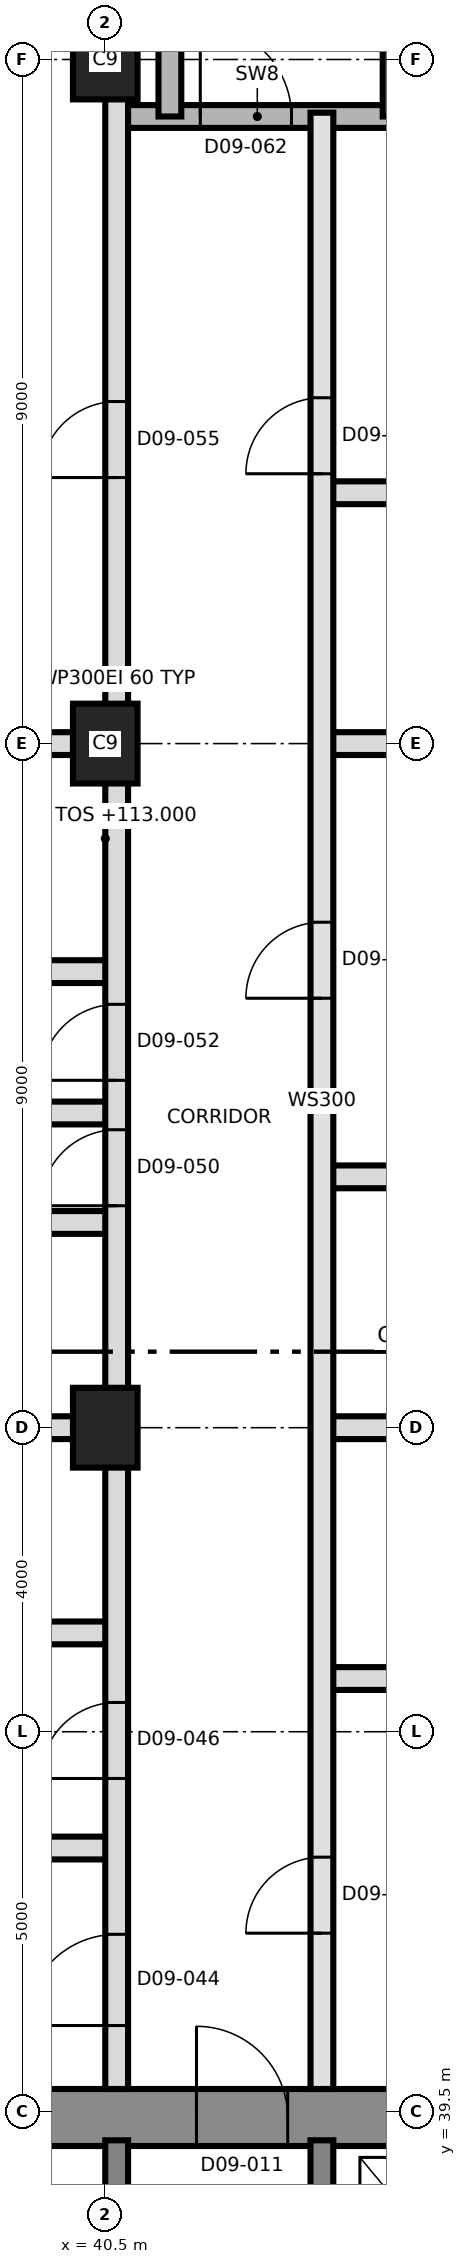
"""IFC4 building model, lengths in metres.
Left out: names, types, materials, properties, quantities, classifications, styles, units other than length and angle.
Written with IfcOpenShell. Run it as: python <this file> out.ifc"""

import sys

from ifc_helpers import new_model, si_unit, direction, frame, frame_2d, origin, origin_2d, place, context, subcontext, project, spatial, rectangle, extrude, element, fill, save


model = new_model("IFC4")
c1 = context("Model", 3, precision=1e-05, world=origin(), true_north=direction((0.0, 1.0)))
c2 = subcontext(c1, "Body", "Model", "MODEL_VIEW")
j1 = project(units=[si_unit("LENGTHUNIT", "METRE"), si_unit("PLANEANGLEUNIT", "RADIAN")], contexts=[c1])
p1 = place(None, origin())
s1 = spatial("IfcSite", under=j1, at=p1, CompositionType="ELEMENT")
p2 = place(p1, origin())
s2 = spatial("IfcBuilding", under=s1, at=p2, CompositionType="ELEMENT")
p3 = place(p2, frame((0.0, 0.0, 113.0)))
s3 = spatial("IfcBuildingStorey", under=s2, at=p3, CompositionType="ELEMENT", Elevation=113.0)
p4 = place(p3, frame((31.125, 39.425, 0.0), z_axis=(0.0, 0.0, 1.0), x_axis=(1.0, 0.0, 0.0)))
e1 = element("IfcWall", 1, at=p4, inside=s3, PredefinedType="SHEAR", context=c2, shape_type="SweptSolid", body=[
    extrude(rectangle(XDim=27.0, YDim=0.75, at=frame_2d((13.5, 0.0))), origin(), (0.0, 0.0, 1.0), 3.7),
])
p5 = place(p4, frame((10.575, 0.0, 0.0)))
e2 = element("IfcOpeningElement", 2, at=p5, cuts=e1, PredefinedType="OPENING", context=c2, shape_type="SweptSolid", body=[
    extrude(rectangle(XDim=1.2, YDim=2.1, at=frame_2d((0.6, 1.05))), frame((0.0, 0.385, 0.0), z_axis=(0.0, -1.0, 0.0), x_axis=(1.0, 0.0, 0.0)), (0.0, 0.0, 1.0), 0.77),
])
for number, where, z_axis, x_axis in (
    (3, (40.65, 33.5, 0.0), (0.0, 0.0, 1.0), (0.0, 1.0, 0.0)),
    (4, (43.35, 33.5, 0.0), (0.0, 0.0, 1.0), (0.0, 1.0, 0.0)),
):
    element("IfcWall", number, at=place(p3, frame(where, z_axis=z_axis, x_axis=x_axis)), inside=s3, PredefinedType="SHEAR", context=c2, shape_type="SweptSolid", body=[
        extrude(rectangle(XDim=5.625, YDim=0.3, at=frame_2d((2.812, 0.0))), origin(), (0.0, 0.0, 1.0), 3.7),
    ])
for number, where, z_axis, x_axis in (
    (5, (40.5, 48.5, 0.0), (0.0, 0.0, 1.0), (0.0, 1.0, 0.0)),
    (6, (40.5, 57.5, 0.0), (0.0, 0.0, 1.0), (0.0, 1.0, 0.0)),
    (7, (40.5, 66.5, 0.0), (0.0, 0.0, 1.0), (0.0, 1.0, 0.0)),
):
    element("IfcColumn", number, at=place(p3, frame(where, z_axis=z_axis, x_axis=x_axis)), inside=s3, PredefinedType="COLUMN", context=c2, shape_type="SweptSolid", body=[
        extrude(rectangle(XDim=1.05, YDim=0.85, at=origin_2d()), origin(), (0.0, 0.0, 1.0), 3.7),
    ])
p6 = place(p3, frame((30.35, 42.97, 0.0), z_axis=(0.0, 0.0, 1.0), x_axis=(1.0, 0.0, 0.0)))
e8 = element("IfcWall", 8, at=p6, inside=s3, PredefinedType="PARTITIONING", context=c2, shape_type="SweptSolid", body=[
    extrude(rectangle(XDim=10.3, YDim=0.3, at=frame_2d((5.15, 0.0))), origin(), (0.0, 0.0, 1.0), 3.4),
])
p7 = place(p3, frame((43.35, 45.2, 0.0), z_axis=(0.0, 0.0, 1.0), x_axis=(1.0, 0.0, 0.0)))
e9 = element("IfcWall", 9, at=p7, inside=s3, PredefinedType="PARTITIONING", context=c2, shape_type="SweptSolid", body=[
    extrude(rectangle(XDim=3.5, YDim=0.3, at=frame_2d((1.75, 0.0))), origin(), (0.0, 0.0, 1.0), 3.4),
])
p8 = place(p3, frame((37.45, 45.8, 0.0), z_axis=(0.0, 0.0, 1.0), x_axis=(1.0, 0.0, 0.0)))
e10 = element("IfcWall", 10, at=p8, inside=s3, PredefinedType="PARTITIONING", context=c2, shape_type="SweptSolid", body=[
    extrude(rectangle(XDim=3.2, YDim=0.3, at=frame_2d((1.6, 0.0))), origin(), (0.0, 0.0, 1.0), 3.4),
])
p9 = place(p3, frame((30.35, 48.5, 0.0), z_axis=(0.0, 0.0, 1.0), x_axis=(1.0, 0.0, 0.0)))
e11 = element("IfcWall", 11, at=p9, inside=s3, PredefinedType="PARTITIONING", context=c2, shape_type="SweptSolid", body=[
    extrude(rectangle(XDim=10.3, YDim=0.3, at=frame_2d((5.15, 0.0))), origin(), (0.0, 0.0, 1.0), 3.4),
])
p10 = place(p3, frame((43.35, 48.5, 0.0), z_axis=(0.0, 0.0, 1.0), x_axis=(1.0, 0.0, 0.0)))
e12 = element("IfcWall", 12, at=p10, inside=s3, PredefinedType="PARTITIONING", context=c2, shape_type="SweptSolid", body=[
    extrude(rectangle(XDim=7.48, YDim=0.3, at=frame_2d((3.74, 0.0))), origin(), (0.0, 0.0, 1.0), 3.4),
])
p11 = place(p3, frame((37.35, 51.2, 0.0), z_axis=(0.0, 0.0, 1.0), x_axis=(1.0, 0.0, 0.0)))
e13 = element("IfcWall", 13, at=p11, inside=s3, PredefinedType="PARTITIONING", context=c2, shape_type="SweptSolid", body=[
    extrude(rectangle(XDim=3.3, YDim=0.3, at=frame_2d((1.65, 0.0))), origin(), (0.0, 0.0, 1.0), 3.4),
])
p12 = place(p3, frame((43.35, 51.8, 0.0), z_axis=(0.0, 0.0, 1.0), x_axis=(1.0, 0.0, 0.0)))
e14 = element("IfcWall", 14, at=p12, inside=s3, PredefinedType="PARTITIONING", context=c2, shape_type="SweptSolid", body=[
    extrude(rectangle(XDim=3.5, YDim=0.3, at=frame_2d((1.75, 0.0))), origin(), (0.0, 0.0, 1.0), 3.4),
])
p13 = place(p3, frame((30.35, 52.64, 0.0), z_axis=(0.0, 0.0, 1.0), x_axis=(1.0, 0.0, 0.0)))
e15 = element("IfcWall", 15, at=p13, inside=s3, PredefinedType="PARTITIONING", context=c2, shape_type="SweptSolid", body=[
    extrude(rectangle(XDim=10.3, YDim=0.3, at=frame_2d((5.15, 0.0))), origin(), (0.0, 0.0, 1.0), 3.4),
])
p14 = place(p3, frame((37.35, 54.5, 0.0), z_axis=(0.0, 0.0, 1.0), x_axis=(1.0, 0.0, 0.0)))
e16 = element("IfcWall", 16, at=p14, inside=s3, PredefinedType="PARTITIONING", context=c2, shape_type="SweptSolid", body=[
    extrude(rectangle(XDim=3.3, YDim=0.3, at=frame_2d((1.65, 0.0))), origin(), (0.0, 0.0, 1.0), 3.4),
])
p15 = place(p3, frame((30.35, 57.5, 0.0), z_axis=(0.0, 0.0, 1.0), x_axis=(1.0, 0.0, 0.0)))
e17 = element("IfcWall", 17, at=p15, inside=s3, PredefinedType="PARTITIONING", context=c2, shape_type="SweptSolid", body=[
    extrude(rectangle(XDim=10.3, YDim=0.3, at=frame_2d((5.15, 0.0))), origin(), (0.0, 0.0, 1.0), 3.4),
])
p16 = place(p3, frame((43.35, 57.5, 0.0), z_axis=(0.0, 0.0, 1.0), x_axis=(1.0, 0.0, 0.0)))
e18 = element("IfcWall", 18, at=p16, inside=s3, PredefinedType="PARTITIONING", context=c2, shape_type="SweptSolid", body=[
    extrude(rectangle(XDim=7.48, YDim=0.3, at=frame_2d((3.74, 0.0))), origin(), (0.0, 0.0, 1.0), 3.4),
])
p17 = place(p3, frame((43.35, 60.8, 0.0), z_axis=(0.0, 0.0, 1.0), x_axis=(1.0, 0.0, 0.0)))
e19 = element("IfcWall", 19, at=p17, inside=s3, PredefinedType="PARTITIONING", context=c2, shape_type="SweptSolid", body=[
    extrude(rectangle(XDim=3.5, YDim=0.3, at=frame_2d((1.75, 0.0))), origin(), (0.0, 0.0, 1.0), 3.4),
])
p18 = place(p3, frame((40.65, 65.75, 0.0), z_axis=(0.0, 0.0, 1.0), x_axis=(1.0, 0.0, 0.0)))
e20 = element("IfcWall", 20, at=p18, inside=s3, PredefinedType="SHEAR", context=c2, shape_type="SweptSolid", body=[
    extrude(rectangle(XDim=3.7, YDim=0.3, at=frame_2d((1.85, 0.0))), origin(), (0.0, 0.0, 1.0), 3.4),
])
p19 = place(p18, frame((1.1, 0.0, 0.0)))
e21 = element("IfcOpeningElement", 21, at=p19, cuts=e20, PredefinedType="OPENING", context=c2, shape_type="SweptSolid", body=[
    extrude(rectangle(XDim=1.2, YDim=2.1, at=frame_2d((0.6, 1.05))), frame((0.0, 0.16, 0.0), z_axis=(0.0, -1.0, 0.0), x_axis=(1.0, 0.0, 0.0)), (0.0, 0.0, 1.0), 0.32),
])
p20 = place(p3, frame((40.65, 39.8, 0.0), z_axis=(0.0, 0.0, 1.0), x_axis=(0.0, 1.0, 0.0)))
e22 = element("IfcWall", 22, at=p20, inside=s3, PredefinedType="PARTITIONING", context=c2, shape_type="SweptSolid", body=[
    extrude(rectangle(XDim=37.09, YDim=0.3, at=frame_2d((18.545, 0.0))), origin(), (0.0, 0.0, 1.0), 3.4),
])
p21 = place(p20, frame((0.835, 0.0, 0.0)))
e23 = element("IfcOpeningElement", 23, at=p21, cuts=e22, PredefinedType="OPENING", context=c2, shape_type="SweptSolid", body=[
    extrude(rectangle(XDim=1.2, YDim=2.1, at=frame_2d((0.6, 1.05))), frame((0.0, 0.16, 0.0), z_axis=(0.0, -1.0, 0.0), x_axis=(1.0, 0.0, 0.0)), (0.0, 0.0, 1.0), 0.32),
])
p22 = place(p20, frame((4.085, 0.0, 0.0)))
e24 = element("IfcOpeningElement", 24, at=p22, cuts=e22, PredefinedType="OPENING", context=c2, shape_type="SweptSolid", body=[
    extrude(rectangle(XDim=1.0, YDim=2.1, at=frame_2d((0.5, 1.05))), frame((0.0, 0.16, 0.0), z_axis=(0.0, -1.0, 0.0), x_axis=(1.0, 0.0, 0.0)), (0.0, 0.0, 1.0), 0.32),
])
p23 = place(p20, frame((11.62, 0.0, 0.0)))
e25 = element("IfcOpeningElement", 25, at=p23, cuts=e22, PredefinedType="OPENING", context=c2, shape_type="SweptSolid", body=[
    extrude(rectangle(XDim=1.0, YDim=2.4, at=frame_2d((0.5, 1.2))), frame((0.0, 0.16, 0.0), z_axis=(0.0, -1.0, 0.0), x_axis=(1.0, 0.0, 0.0)), (0.0, 0.0, 1.0), 0.32),
])
p24 = place(p20, frame((13.27, 0.0, 0.0)))
e26 = element("IfcOpeningElement", 26, at=p24, cuts=e22, PredefinedType="OPENING", context=c2, shape_type="SweptSolid", body=[
    extrude(rectangle(XDim=1.0, YDim=2.4, at=frame_2d((0.5, 1.2))), frame((0.0, 0.16, 0.0), z_axis=(0.0, -1.0, 0.0), x_axis=(1.0, 0.0, 0.0)), (0.0, 0.0, 1.0), 0.32),
])
p25 = place(p20, frame((21.2, 0.0, 0.0)))
e27 = element("IfcOpeningElement", 27, at=p25, cuts=e22, PredefinedType="OPENING", context=c2, shape_type="SweptSolid", body=[
    extrude(rectangle(XDim=1.0, YDim=2.4, at=frame_2d((0.5, 1.2))), frame((0.0, 0.16, 0.0), z_axis=(0.0, -1.0, 0.0), x_axis=(1.0, 0.0, 0.0)), (0.0, 0.0, 1.0), 0.32),
])
p26 = place(p3, frame((41.35, 65.75, 0.0), z_axis=(0.0, 0.0, 1.0), x_axis=(0.0, 1.0, 0.0)))
e28 = element("IfcWall", 28, at=p26, inside=s3, PredefinedType="SHEAR", context=c2, shape_type="SweptSolid", body=[
    extrude(rectangle(XDim=8.85, YDim=0.3, at=frame_2d((4.425, 0.0))), origin(), (0.0, 0.0, 1.0), 3.4),
])
p27 = place(p3, frame((43.35, 39.8, 0.0), z_axis=(0.0, 0.0, 1.0), x_axis=(0.0, 1.0, 0.0)))
e29 = element("IfcWall", 29, at=p27, inside=s3, PredefinedType="SOLIDWALL", context=c2, shape_type="SweptSolid", body=[
    extrude(rectangle(XDim=26.0, YDim=0.3, at=frame_2d((13.0, 0.0))), origin(), (0.0, 0.0, 1.0), 3.4),
])
p28 = place(p27, frame((2.05, 0.0, 0.0)))
e30 = element("IfcOpeningElement", 30, at=p28, cuts=e29, PredefinedType="OPENING", context=c2, shape_type="SweptSolid", body=[
    extrude(rectangle(XDim=1.0, YDim=2.4, at=frame_2d((0.5, 1.2))), frame((0.0, 0.16, 0.0), z_axis=(0.0, -1.0, 0.0), x_axis=(1.0, 0.0, 0.0)), (0.0, 0.0, 1.0), 0.32),
])
p29 = place(p27, frame((14.35, 0.0, 0.0)))
e31 = element("IfcOpeningElement", 31, at=p29, cuts=e29, PredefinedType="OPENING", context=c2, shape_type="SweptSolid", body=[
    extrude(rectangle(XDim=1.0, YDim=2.4, at=frame_2d((0.5, 1.2))), frame((0.0, 0.16, 0.0), z_axis=(0.0, -1.0, 0.0), x_axis=(1.0, 0.0, 0.0)), (0.0, 0.0, 1.0), 0.32),
])
p30 = place(p27, frame((21.25, 0.0, 0.0)))
e32 = element("IfcOpeningElement", 32, at=p30, cuts=e29, PredefinedType="OPENING", context=c2, shape_type="SweptSolid", body=[
    extrude(rectangle(XDim=1.0, YDim=2.4, at=frame_2d((0.5, 1.2))), frame((0.0, 0.16, 0.0), z_axis=(0.0, -1.0, 0.0), x_axis=(1.0, 0.0, 0.0)), (0.0, 0.0, 1.0), 0.32),
])
p31 = place(p3, frame((44.3, 65.75, 0.0), z_axis=(0.0, 0.0, 1.0), x_axis=(0.0, 1.0, 0.0)))
e33 = element("IfcWall", 33, at=p31, inside=s3, PredefinedType="SHEAR", context=c2, shape_type="SweptSolid", body=[
    extrude(rectangle(XDim=8.85, YDim=0.3, at=frame_2d((4.425, 0.0))), origin(), (0.0, 0.0, 1.0), 3.4),
])
p32 = place(p5, origin())
e34 = element("IfcDoor", 34, at=p32, inside=s3, OperationType="SINGLE_SWING_RIGHT", PredefinedType="DOOR", context=c2, shape_type="SweptSolid", body=[
    extrude(rectangle(XDim=1.2, YDim=2.1, at=frame_2d((0.6, 1.05))), frame((0.0, 0.025, 0.0), z_axis=(0.0, -1.0, 0.0), x_axis=(1.0, 0.0, 0.0)), (0.0, 0.0, 1.0), 0.05),
])
fill(e2, e34)
p33 = place(p28, origin())
e35 = element("IfcDoor", 35, at=p33, inside=s3, OperationType="SINGLE_SWING_LEFT", PredefinedType="DOOR", context=c2, shape_type="SweptSolid", body=[
    extrude(rectangle(XDim=1.0, YDim=2.4, at=frame_2d((0.5, 1.2))), frame((0.0, 0.025, 0.0), z_axis=(0.0, -1.0, 0.0), x_axis=(1.0, 0.0, 0.0)), (0.0, 0.0, 1.0), 0.05),
])
fill(e30, e35)
p34 = place(p21, origin())
e36 = element("IfcDoor", 36, at=p34, inside=s3, OperationType="SINGLE_SWING_RIGHT", PredefinedType="DOOR", context=c2, shape_type="SweptSolid", body=[
    extrude(rectangle(XDim=1.2, YDim=2.1, at=frame_2d((0.6, 1.05))), frame((0.0, 0.025, 0.0), z_axis=(0.0, -1.0, 0.0), x_axis=(1.0, 0.0, 0.0)), (0.0, 0.0, 1.0), 0.05),
])
fill(e23, e36)
p35 = place(p22, origin())
e37 = element("IfcDoor", 37, at=p35, inside=s3, OperationType="SINGLE_SWING_LEFT", PredefinedType="DOOR", context=c2, shape_type="SweptSolid", body=[
    extrude(rectangle(XDim=1.0, YDim=2.1, at=frame_2d((0.5, 1.05))), frame((0.0, 0.025, 0.0), z_axis=(0.0, -1.0, 0.0), x_axis=(1.0, 0.0, 0.0)), (0.0, 0.0, 1.0), 0.05),
])
fill(e24, e37)
p36 = place(p29, origin())
e38 = element("IfcDoor", 38, at=p36, inside=s3, OperationType="SINGLE_SWING_RIGHT", PredefinedType="DOOR", context=c2, shape_type="SweptSolid", body=[
    extrude(rectangle(XDim=1.0, YDim=2.4, at=frame_2d((0.5, 1.2))), frame((0.0, 0.025, 0.0), z_axis=(0.0, -1.0, 0.0), x_axis=(1.0, 0.0, 0.0)), (0.0, 0.0, 1.0), 0.05),
])
fill(e31, e38)
p37 = place(p23, origin())
e39 = element("IfcDoor", 39, at=p37, inside=s3, OperationType="SINGLE_SWING_LEFT", PredefinedType="DOOR", context=c2, shape_type="SweptSolid", body=[
    extrude(rectangle(XDim=1.0, YDim=2.4, at=frame_2d((0.5, 1.2))), frame((0.0, 0.025, 0.0), z_axis=(0.0, -1.0, 0.0), x_axis=(1.0, 0.0, 0.0)), (0.0, 0.0, 1.0), 0.05),
])
fill(e25, e39)
p38 = place(p24, origin())
e40 = element("IfcDoor", 40, at=p38, inside=s3, OperationType="SINGLE_SWING_LEFT", PredefinedType="DOOR", context=c2, shape_type="SweptSolid", body=[
    extrude(rectangle(XDim=1.0, YDim=2.4, at=frame_2d((0.5, 1.2))), frame((0.0, 0.025, 0.0), z_axis=(0.0, -1.0, 0.0), x_axis=(1.0, 0.0, 0.0)), (0.0, 0.0, 1.0), 0.05),
])
fill(e26, e40)
p39 = place(p30, origin())
e41 = element("IfcDoor", 41, at=p39, inside=s3, OperationType="SINGLE_SWING_RIGHT", PredefinedType="DOOR", context=c2, shape_type="SweptSolid", body=[
    extrude(rectangle(XDim=1.0, YDim=2.4, at=frame_2d((0.5, 1.2))), frame((0.0, 0.025, 0.0), z_axis=(0.0, -1.0, 0.0), x_axis=(1.0, 0.0, 0.0)), (0.0, 0.0, 1.0), 0.05),
])
fill(e32, e41)
p40 = place(p25, origin())
e42 = element("IfcDoor", 42, at=p40, inside=s3, OperationType="SINGLE_SWING_LEFT", PredefinedType="DOOR", context=c2, shape_type="SweptSolid", body=[
    extrude(rectangle(XDim=1.0, YDim=2.4, at=frame_2d((0.5, 1.2))), frame((0.0, 0.025, 0.0), z_axis=(0.0, -1.0, 0.0), x_axis=(1.0, 0.0, 0.0)), (0.0, 0.0, 1.0), 0.05),
])
fill(e27, e42)
p41 = place(p19, origin())
e43 = element("IfcDoor", 43, at=p41, inside=s3, OperationType="SINGLE_SWING_RIGHT", PredefinedType="DOOR", context=c2, shape_type="SweptSolid", body=[
    extrude(rectangle(XDim=1.2, YDim=2.1, at=frame_2d((0.6, 1.05))), frame((0.0, 0.025, 0.0), z_axis=(0.0, -1.0, 0.0), x_axis=(1.0, 0.0, 0.0)), (0.0, 0.0, 1.0), 0.05),
])
fill(e21, e43)
save(model, sys.argv[1])
